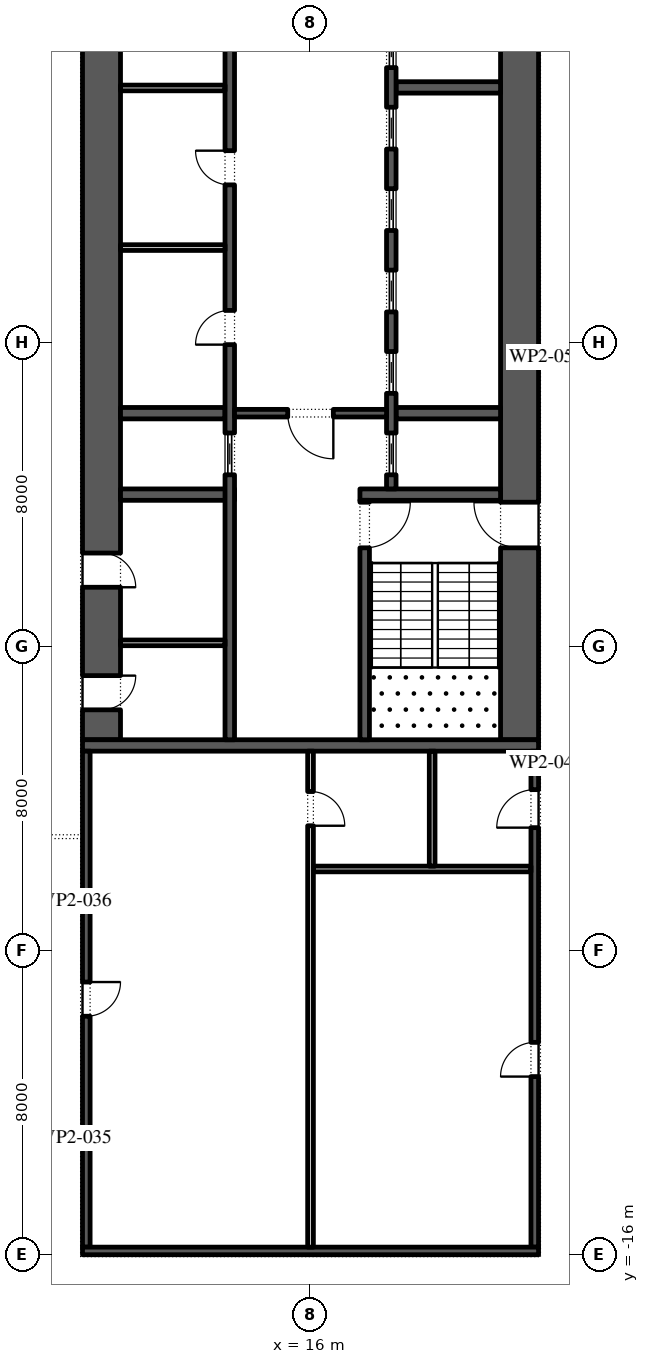
"""IFC4 building model, lengths in metres.
Left out: names, types, materials, properties, quantities, classifications, styles, units other than length and angle.
Written with IfcOpenShell. Run it as: python <this file> out.ifc"""

import sys

from ifc_helpers import new_model, si_unit, direction, frame, frame_2d, origin, place, context, subcontext, project, spatial, rectangle, extrude, element, fill, save


model = new_model("IFC4")
c1 = context("Model", 3, precision=1e-05, world=origin(), true_north=direction((0.0, 1.0)))
c2 = subcontext(c1, "Body", "Model", "MODEL_VIEW")
j1 = project(units=[si_unit("LENGTHUNIT", "METRE"), si_unit("PLANEANGLEUNIT", "RADIAN")], contexts=[c1])
p1 = place(None, origin())
s1 = spatial("IfcSite", under=j1, at=p1, CompositionType="ELEMENT")
p2 = place(p1, origin())
s2 = spatial("IfcBuilding", under=s1, at=p2, CompositionType="ELEMENT")
p3 = place(p2, frame((0.0, 0.0, 56.4)))
s3 = spatial("IfcBuildingStorey", under=s2, at=p3, CompositionType="ELEMENT", Elevation=56.4)
p4 = place(p3, frame((21.5, -2.45, 0.0), z_axis=(0.0, 0.0, 1.0), x_axis=(0.0, 1.0, 0.0)))
e1 = element("IfcWall", 1, at=p4, inside=s3, PredefinedType="SHEAR", context=c2, shape_type="SweptSolid", body=[
    extrude(rectangle(XDim=27.9, YDim=1.0, at=frame_2d((13.95, 0.0))), origin(), (0.0, 0.0, 1.0), 4.0),
])
p5 = place(p4, frame((5.05, 0.0, 0.0)))
e2 = element("IfcOpeningElement", 2, at=p5, cuts=e1, PredefinedType="OPENING", context=c2, shape_type="SweptSolid", body=[
    extrude(rectangle(XDim=1.2, YDim=2.1, at=frame_2d((0.6, 1.05))), frame((0.0, 0.51, 0.0), z_axis=(0.0, -1.0, 0.0), x_axis=(1.0, 0.0, 0.0)), (0.0, 0.0, 1.0), 1.02),
])
p6 = place(p4, frame((21.65, 0.0, 0.0)))
e3 = element("IfcOpeningElement", 3, at=p6, cuts=e1, PredefinedType="OPENING", context=c2, shape_type="SweptSolid", body=[
    extrude(rectangle(XDim=1.2, YDim=2.1, at=frame_2d((0.6, 1.05))), frame((0.0, 0.51, 0.0), z_axis=(0.0, -1.0, 0.0), x_axis=(1.0, 0.0, 0.0)), (0.0, 0.0, 1.0), 1.02),
])
p7 = place(p3, frame((10.5, -2.45, 0.0), z_axis=(0.0, 0.0, 1.0), x_axis=(0.0, 1.0, 0.0)))
e4 = element("IfcWall", 4, at=p7, inside=s3, PredefinedType="SHEAR", context=c2, shape_type="SweptSolid", body=[
    extrude(rectangle(XDim=27.9, YDim=1.0, at=frame_2d((13.95, 0.0))), origin(), (0.0, 0.0, 1.0), 4.0),
])
p8 = place(p7, frame((23.65, 0.0, 0.0)))
e5 = element("IfcOpeningElement", 5, at=p8, cuts=e4, PredefinedType="OPENING", context=c2, shape_type="SweptSolid", body=[
    extrude(rectangle(XDim=2.4, YDim=2.1, at=frame_2d((1.2, 1.05))), frame((0.0, 0.51, 0.0), z_axis=(0.0, -1.0, 0.0), x_axis=(1.0, 0.0, 0.0)), (0.0, 0.0, 1.0), 1.02),
])
p9 = place(p7, frame((0.788, 0.0, 0.0)))
e6 = element("IfcOpeningElement", 6, at=p9, cuts=e4, PredefinedType="OPENING", context=c2, shape_type="SweptSolid", body=[
    extrude(rectangle(XDim=0.9, YDim=2.1, at=frame_2d((0.45, 1.05))), frame((0.0, 0.51, 0.0), z_axis=(0.0, -1.0, 0.0), x_axis=(1.0, 0.0, 0.0)), (0.0, 0.0, 1.0), 1.02),
])
p10 = place(p7, frame((4.012, 0.0, 0.0)))
e7 = element("IfcOpeningElement", 7, at=p10, cuts=e4, PredefinedType="OPENING", context=c2, shape_type="SweptSolid", body=[
    extrude(rectangle(XDim=0.9, YDim=2.1, at=frame_2d((0.45, 1.05))), frame((0.0, 0.51, 0.0), z_axis=(0.0, -1.0, 0.0), x_axis=(1.0, 0.0, 0.0)), (0.0, 0.0, 1.0), 1.02),
])
p11 = place(p3, frame((10.0, -2.6, 0.0), z_axis=(0.0, 0.0, 1.0), x_axis=(1.0, 0.0, 0.0)))
e8 = element("IfcWall", 8, at=p11, inside=s3, PredefinedType="SHEAR", context=c2, shape_type="SweptSolid", body=[
    extrude(rectangle(XDim=12.0, YDim=0.3, at=frame_2d((6.0, 0.0))), origin(), (0.0, 0.0, 1.0), 4.0),
])
p12 = place(p3, frame((17.3, 4.0, 0.0), z_axis=(0.0, 0.0, 1.0), x_axis=(1.0, 0.0, 0.0)))
e9 = element("IfcWall", 9, at=p12, inside=s3, PredefinedType="SHEAR", context=c2, shape_type="SweptSolid", body=[
    extrude(rectangle(XDim=3.7, YDim=0.3, at=frame_2d((1.85, 0.0))), origin(), (0.0, 0.0, 1.0), 4.0),
])
p13 = place(p3, frame((17.425, -2.45, 0.0), z_axis=(0.0, 0.0, 1.0), x_axis=(0.0, 1.0, 0.0)))
e10 = element("IfcWall", 10, at=p13, inside=s3, PredefinedType="SHEAR", context=c2, shape_type="SweptSolid", body=[
    extrude(rectangle(XDim=6.3, YDim=0.25, at=frame_2d((3.15, 0.0))), origin(), (0.0, 0.0, 1.0), 4.0),
])
p14 = place(p13, frame((5.05, 0.0, 0.0)))
e11 = element("IfcOpeningElement", 11, at=p14, cuts=e10, PredefinedType="OPENING", context=c2, shape_type="SweptSolid", body=[
    extrude(rectangle(XDim=1.2, YDim=2.1, at=frame_2d((0.6, 1.05))), frame((0.0, 0.135, 0.0), z_axis=(0.0, -1.0, 0.0), x_axis=(1.0, 0.0, 0.0)), (0.0, 0.0, 1.0), 0.27),
])
for number, where, z_axis, x_axis in (
    (12, (18.25, 6.143, 0.0), (0.0, 0.0, 1.0), (1.0, 0.0, 0.0)),
    (13, (18.25, 14.714, 0.0), (0.0, 0.0, 1.0), (1.0, 0.0, 0.0)),
):
    element("IfcWall", number, at=place(p3, frame(where, z_axis=z_axis, x_axis=x_axis)), inside=s3, PredefinedType="SHEAR", context=c2, shape_type="SweptSolid", body=[
        extrude(rectangle(XDim=2.75, YDim=0.3, at=frame_2d((1.375, 0.0))), origin(), (0.0, 0.0, 1.0), 4.0),
    ])
p15 = place(p3, frame((18.125, 4.15, 0.0), z_axis=(0.0, 0.0, 1.0), x_axis=(0.0, 1.0, 0.0)))
e14 = element("IfcWall", 14, at=p15, inside=s3, PredefinedType="SHEAR", context=c2, shape_type="SweptSolid", body=[
    extrude(rectangle(XDim=14.7, YDim=0.25, at=frame_2d((7.35, 0.0))), origin(), (0.0, 0.0, 1.0), 4.0),
])
p16 = place(p15, frame((0.371, 0.0, 0.0)))
e15 = element("IfcOpeningElement", 15, at=p16, cuts=e14, PredefinedType="OPENING", context=c2, shape_type="SweptSolid", body=[
    extrude(rectangle(XDim=1.1, YDim=2.1, at=frame_2d((0.55, 1.05))), frame((0.0, 0.135, 0.0), z_axis=(0.0, -1.0, 0.0), x_axis=(1.0, 0.0, 0.0)), (0.0, 0.0, 1.0), 0.27),
])
p17 = place(p15, frame((2.514, 0.0, 0.0)))
e16 = element("IfcOpeningElement", 16, at=p17, cuts=e14, PredefinedType="OPENING", context=c2, shape_type="SweptSolid", body=[
    extrude(rectangle(XDim=1.1, YDim=2.1, at=frame_2d((0.55, 1.05))), frame((0.0, 0.135, 0.0), z_axis=(0.0, -1.0, 0.0), x_axis=(1.0, 0.0, 0.0)), (0.0, 0.0, 1.0), 0.27),
])
p18 = place(p15, frame((4.657, 0.0, 0.0)))
e17 = element("IfcOpeningElement", 17, at=p18, cuts=e14, PredefinedType="OPENING", context=c2, shape_type="SweptSolid", body=[
    extrude(rectangle(XDim=1.1, YDim=2.1, at=frame_2d((0.55, 1.05))), frame((0.0, 0.135, 0.0), z_axis=(0.0, -1.0, 0.0), x_axis=(1.0, 0.0, 0.0)), (0.0, 0.0, 1.0), 0.27),
])
p19 = place(p15, frame((6.8, 0.0, 0.0)))
e18 = element("IfcOpeningElement", 18, at=p19, cuts=e14, PredefinedType="OPENING", context=c2, shape_type="SweptSolid", body=[
    extrude(rectangle(XDim=1.1, YDim=2.1, at=frame_2d((0.55, 1.05))), frame((0.0, 0.135, 0.0), z_axis=(0.0, -1.0, 0.0), x_axis=(1.0, 0.0, 0.0)), (0.0, 0.0, 1.0), 0.27),
])
p20 = place(p15, frame((8.943, 0.0, 0.0)))
e19 = element("IfcOpeningElement", 19, at=p20, cuts=e14, PredefinedType="OPENING", context=c2, shape_type="SweptSolid", body=[
    extrude(rectangle(XDim=1.1, YDim=2.1, at=frame_2d((0.55, 1.05))), frame((0.0, 0.135, 0.0), z_axis=(0.0, -1.0, 0.0), x_axis=(1.0, 0.0, 0.0)), (0.0, 0.0, 1.0), 0.27),
])
p21 = place(p15, frame((11.086, 0.0, 0.0)))
e20 = element("IfcOpeningElement", 20, at=p21, cuts=e14, PredefinedType="OPENING", context=c2, shape_type="SweptSolid", body=[
    extrude(rectangle(XDim=1.1, YDim=2.1, at=frame_2d((0.55, 1.05))), frame((0.0, 0.135, 0.0), z_axis=(0.0, -1.0, 0.0), x_axis=(1.0, 0.0, 0.0)), (0.0, 0.0, 1.0), 0.27),
])
p22 = place(p15, frame((13.229, 0.0, 0.0)))
e21 = element("IfcOpeningElement", 21, at=p22, cuts=e14, PredefinedType="OPENING", context=c2, shape_type="SweptSolid", body=[
    extrude(rectangle(XDim=1.1, YDim=2.1, at=frame_2d((0.55, 1.05))), frame((0.0, 0.135, 0.0), z_axis=(0.0, -1.0, 0.0), x_axis=(1.0, 0.0, 0.0)), (0.0, 0.0, 1.0), 0.27),
])
p23 = place(p3, frame((11.0, 4.0, 0.0), z_axis=(0.0, 0.0, 1.0), x_axis=(1.0, 0.0, 0.0)))
e22 = element("IfcWall", 22, at=p23, inside=s3, PredefinedType="SHEAR", context=c2, shape_type="SweptSolid", body=[
    extrude(rectangle(XDim=3.0, YDim=0.3, at=frame_2d((1.5, 0.0))), origin(), (0.0, 0.0, 1.0), 4.0),
])
p24 = place(p3, frame((11.0, 6.143, 0.0), z_axis=(0.0, 0.0, 1.0), x_axis=(1.0, 0.0, 0.0)))
e23 = element("IfcWall", 23, at=p24, inside=s3, PredefinedType="SHEAR", context=c2, shape_type="SweptSolid", body=[
    extrude(rectangle(XDim=2.75, YDim=0.3, at=frame_2d((1.375, 0.0))), origin(), (0.0, 0.0, 1.0), 4.0),
])
p25 = place(p3, frame((13.875, -2.45, 0.0), z_axis=(0.0, 0.0, 1.0), x_axis=(0.0, 1.0, 0.0)))
e24 = element("IfcWall", 24, at=p25, inside=s3, PredefinedType="SHEAR", context=c2, shape_type="SweptSolid", body=[
    extrude(rectangle(XDim=21.3, YDim=0.25, at=frame_2d((10.65, 0.0))), origin(), (0.0, 0.0, 1.0), 4.0),
])
p26 = place(p25, frame((10.396, 0.0, 0.0)))
e25 = element("IfcOpeningElement", 25, at=p26, cuts=e24, PredefinedType="OPENING", context=c2, shape_type="SweptSolid", body=[
    extrude(rectangle(XDim=0.9, YDim=2.1, at=frame_2d((0.45, 1.05))), frame((0.0, 0.135, 0.0), z_axis=(0.0, -1.0, 0.0), x_axis=(1.0, 0.0, 0.0)), (0.0, 0.0, 1.0), 0.27),
])
p27 = place(p25, frame((14.6, 0.0, 0.0)))
e26 = element("IfcOpeningElement", 26, at=p27, cuts=e24, PredefinedType="OPENING", context=c2, shape_type="SweptSolid", body=[
    extrude(rectangle(XDim=0.9, YDim=2.1, at=frame_2d((0.45, 1.05))), frame((0.0, 0.135, 0.0), z_axis=(0.0, -1.0, 0.0), x_axis=(1.0, 0.0, 0.0)), (0.0, 0.0, 1.0), 0.27),
])
p28 = place(p25, frame((18.775, 0.0, 0.0)))
e27 = element("IfcOpeningElement", 27, at=p28, cuts=e24, PredefinedType="OPENING", context=c2, shape_type="SweptSolid", body=[
    extrude(rectangle(XDim=0.9, YDim=2.1, at=frame_2d((0.45, 1.05))), frame((0.0, 0.135, 0.0), z_axis=(0.0, -1.0, 0.0), x_axis=(1.0, 0.0, 0.0)), (0.0, 0.0, 1.0), 0.27),
])
p29 = place(p25, frame((6.971, 0.0, 0.0)))
e28 = element("IfcOpeningElement", 28, at=p29, cuts=e24, PredefinedType="OPENING", context=c2, shape_type="SweptSolid", body=[
    extrude(rectangle(XDim=1.1, YDim=2.1, at=frame_2d((0.55, 1.05))), frame((0.0, 0.135, 0.0), z_axis=(0.0, -1.0, 0.0), x_axis=(1.0, 0.0, 0.0)), (0.0, 0.0, 1.0), 0.27),
])
for number, where, z_axis, x_axis in (
    (29, (11.0, 10.5, 0.0), (0.0, 0.0, 1.0), (1.0, 0.0, 0.0)),
    (30, (11.0, 14.7, 0.0), (0.0, 0.0, 1.0), (1.0, 0.0, 0.0)),
):
    element("IfcWall", number, at=place(p3, frame(where, z_axis=z_axis, x_axis=x_axis)), inside=s3, PredefinedType="PARTITIONING", context=c2, shape_type="SweptSolid", body=[
        extrude(rectangle(XDim=2.75, YDim=0.15, at=frame_2d((1.375, 0.0))), origin(), (0.0, 0.0, 1.0), 4.0),
    ])
p30 = place(p3, frame((14.0, 6.143, 0.0), z_axis=(0.0, 0.0, 1.0), x_axis=(1.0, 0.0, 0.0)))
e31 = element("IfcWall", 31, at=p30, inside=s3, PredefinedType="SHEAR", context=c2, shape_type="SweptSolid", body=[
    extrude(rectangle(XDim=4.0, YDim=0.2, at=frame_2d((2.0, 0.0))), origin(), (0.0, 0.0, 1.0), 4.0),
])
p31 = place(p30, frame((1.4, 0.0, 0.0)))
e32 = element("IfcOpeningElement", 32, at=p31, cuts=e31, PredefinedType="OPENING", context=c2, shape_type="SweptSolid", body=[
    extrude(rectangle(XDim=1.2, YDim=2.1, at=frame_2d((0.6, 1.05))), frame((0.0, 0.11, 0.0), z_axis=(0.0, -1.0, 0.0), x_axis=(1.0, 0.0, 0.0)), (0.0, 0.0, 1.0), 0.22),
])
p32 = place(p3, frame((11.0, 0.1, 0.0), z_axis=(0.0, 0.0, 1.0), x_axis=(1.0, 0.0, 0.0)))
e33 = element("IfcWall", 33, at=p32, inside=s3, PredefinedType="PARTITIONING", context=c2, shape_type="SweptSolid", body=[
    extrude(rectangle(XDim=2.75, YDim=0.15, at=frame_2d((1.375, 0.0))), origin(), (0.0, 0.0, 1.0), 4.0),
])
p33 = place(p3, frame((21.9, -15.8, 0.0), z_axis=(0.0, 0.0, 1.0), x_axis=(0.0, 1.0, 0.0)))
e34 = element("IfcWall", 34, at=p33, inside=s3, PredefinedType="SHEAR", context=c2, shape_type="SweptSolid", body=[
    extrude(rectangle(XDim=13.05, YDim=0.2, at=frame_2d((6.525, 0.0))), origin(), (0.0, 0.0, 1.0), 4.0),
])
p34 = place(p33, frame((4.488, 0.0, 0.0)))
e35 = element("IfcOpeningElement", 35, at=p34, cuts=e34, PredefinedType="OPENING", context=c2, shape_type="SweptSolid", body=[
    extrude(rectangle(XDim=0.9, YDim=2.1, at=frame_2d((0.45, 1.05))), frame((0.0, 0.11, 0.0), z_axis=(0.0, -1.0, 0.0), x_axis=(1.0, 0.0, 0.0)), (0.0, 0.0, 1.0), 0.22),
])
p35 = place(p33, frame((11.038, 0.0, 0.0)))
e36 = element("IfcOpeningElement", 36, at=p35, cuts=e34, PredefinedType="OPENING", context=c2, shape_type="SweptSolid", body=[
    extrude(rectangle(XDim=1.0, YDim=2.1, at=frame_2d((0.5, 1.05))), frame((0.0, 0.11, 0.0), z_axis=(0.0, -1.0, 0.0), x_axis=(1.0, 0.0, 0.0)), (0.0, 0.0, 1.0), 0.22),
])
p36 = place(p3, frame((10.1, -15.8, 0.0), z_axis=(0.0, 0.0, 1.0), x_axis=(0.0, 1.0, 0.0)))
e37 = element("IfcWall", 37, at=p36, inside=s3, PredefinedType="SHEAR", context=c2, shape_type="SweptSolid", body=[
    extrude(rectangle(XDim=13.05, YDim=0.2, at=frame_2d((6.525, 0.0))), origin(), (0.0, 0.0, 1.0), 4.0),
])
p37 = place(p36, frame((6.075, 0.0, 0.0)))
e38 = element("IfcOpeningElement", 38, at=p37, cuts=e37, PredefinedType="OPENING", context=c2, shape_type="SweptSolid", body=[
    extrude(rectangle(XDim=0.9, YDim=2.1, at=frame_2d((0.45, 1.05))), frame((0.0, 0.11, 0.0), z_axis=(0.0, -1.0, 0.0), x_axis=(1.0, 0.0, 0.0)), (0.0, 0.0, 1.0), 0.22),
])
p38 = place(p3, frame((10.0, -15.9, 0.0), z_axis=(0.0, 0.0, 1.0), x_axis=(1.0, 0.0, 0.0)))
e39 = element("IfcWall", 39, at=p38, inside=s3, PredefinedType="SHEAR", context=c2, shape_type="SweptSolid", body=[
    extrude(rectangle(XDim=12.0, YDim=0.2, at=frame_2d((6.0, 0.0))), origin(), (0.0, 0.0, 1.0), 4.0),
])
p39 = place(p3, frame((16.0, -15.8, 0.0), z_axis=(0.0, 0.0, 1.0), x_axis=(0.0, 1.0, 0.0)))
e40 = element("IfcWall", 40, at=p39, inside=s3, PredefinedType="PARTITIONING", context=c2, shape_type="SweptSolid", body=[
    extrude(rectangle(XDim=13.05, YDim=0.15, at=frame_2d((6.525, 0.0))), origin(), (0.0, 0.0, 1.0), 4.0),
])
p40 = place(p39, frame((11.087, 0.0, 0.0)))
e41 = element("IfcOpeningElement", 41, at=p40, cuts=e40, PredefinedType="OPENING", context=c2, shape_type="SweptSolid", body=[
    extrude(rectangle(XDim=0.9, YDim=2.1, at=frame_2d((0.45, 1.05))), frame((0.0, 0.085, 0.0), z_axis=(0.0, -1.0, 0.0), x_axis=(1.0, 0.0, 0.0)), (0.0, 0.0, 1.0), 0.17),
])
p41 = place(p3, frame((16.075, -5.85, 0.0), z_axis=(0.0, 0.0, 1.0), x_axis=(1.0, 0.0, 0.0)))
e42 = element("IfcWall", 42, at=p41, inside=s3, PredefinedType="PARTITIONING", context=c2, shape_type="SweptSolid", body=[
    extrude(rectangle(XDim=5.725, YDim=0.15, at=frame_2d((2.863, 0.0))), origin(), (0.0, 0.0, 1.0), 4.0),
])
p42 = place(p3, frame((19.2, -5.775, 0.0), z_axis=(0.0, 0.0, 1.0), x_axis=(0.0, 1.0, 0.0)))
e43 = element("IfcWall", 43, at=p42, inside=s3, PredefinedType="PARTITIONING", context=c2, shape_type="SweptSolid", body=[
    extrude(rectangle(XDim=3.025, YDim=0.15, at=frame_2d((1.512, 0.0))), origin(), (0.0, 0.0, 1.0), 4.0),
])
p43 = place(p16, origin())
e44 = element("IfcDoor", 44, at=p43, inside=s3, OperationType="SLIDING_TO_LEFT", PredefinedType="DOOR", context=c2, shape_type="SweptSolid", body=[
    extrude(rectangle(XDim=1.1, YDim=2.1, at=frame_2d((0.55, 1.05))), frame((0.0, 0.025, 0.0), z_axis=(0.0, -1.0, 0.0), x_axis=(1.0, 0.0, 0.0)), (0.0, 0.0, 1.0), 0.05),
])
fill(e15, e44)
p44 = place(p17, origin())
e45 = element("IfcDoor", 45, at=p44, inside=s3, OperationType="SLIDING_TO_LEFT", PredefinedType="DOOR", context=c2, shape_type="SweptSolid", body=[
    extrude(rectangle(XDim=1.1, YDim=2.1, at=frame_2d((0.55, 1.05))), frame((0.0, 0.025, 0.0), z_axis=(0.0, -1.0, 0.0), x_axis=(1.0, 0.0, 0.0)), (0.0, 0.0, 1.0), 0.05),
])
fill(e16, e45)
p45 = place(p18, origin())
e46 = element("IfcDoor", 46, at=p45, inside=s3, OperationType="SLIDING_TO_LEFT", PredefinedType="DOOR", context=c2, shape_type="SweptSolid", body=[
    extrude(rectangle(XDim=1.1, YDim=2.1, at=frame_2d((0.55, 1.05))), frame((0.0, 0.025, 0.0), z_axis=(0.0, -1.0, 0.0), x_axis=(1.0, 0.0, 0.0)), (0.0, 0.0, 1.0), 0.05),
])
fill(e17, e46)
p46 = place(p19, origin())
e47 = element("IfcDoor", 47, at=p46, inside=s3, OperationType="SLIDING_TO_LEFT", PredefinedType="DOOR", context=c2, shape_type="SweptSolid", body=[
    extrude(rectangle(XDim=1.1, YDim=2.1, at=frame_2d((0.55, 1.05))), frame((0.0, 0.025, 0.0), z_axis=(0.0, -1.0, 0.0), x_axis=(1.0, 0.0, 0.0)), (0.0, 0.0, 1.0), 0.05),
])
fill(e18, e47)
p47 = place(p20, origin())
e48 = element("IfcDoor", 48, at=p47, inside=s3, OperationType="SLIDING_TO_LEFT", PredefinedType="DOOR", context=c2, shape_type="SweptSolid", body=[
    extrude(rectangle(XDim=1.1, YDim=2.1, at=frame_2d((0.55, 1.05))), frame((0.0, 0.025, 0.0), z_axis=(0.0, -1.0, 0.0), x_axis=(1.0, 0.0, 0.0)), (0.0, 0.0, 1.0), 0.05),
])
fill(e19, e48)
p48 = place(p21, origin())
e49 = element("IfcDoor", 49, at=p48, inside=s3, OperationType="SLIDING_TO_LEFT", PredefinedType="DOOR", context=c2, shape_type="SweptSolid", body=[
    extrude(rectangle(XDim=1.1, YDim=2.1, at=frame_2d((0.55, 1.05))), frame((0.0, 0.025, 0.0), z_axis=(0.0, -1.0, 0.0), x_axis=(1.0, 0.0, 0.0)), (0.0, 0.0, 1.0), 0.05),
])
fill(e20, e49)
p49 = place(p26, origin())
e50 = element("IfcDoor", 50, at=p49, inside=s3, OperationType="SINGLE_SWING_RIGHT", PredefinedType="DOOR", context=c2, shape_type="SweptSolid", body=[
    extrude(rectangle(XDim=0.9, YDim=2.1, at=frame_2d((0.45, 1.05))), frame((0.0, 0.125, 0.0), z_axis=(0.0, -1.0, 0.0), x_axis=(1.0, 0.0, 0.0)), (0.0, 0.0, 1.0), 0.05),
])
fill(e25, e50)
p50 = place(p27, origin())
e51 = element("IfcDoor", 51, at=p50, inside=s3, OperationType="SINGLE_SWING_LEFT", PredefinedType="DOOR", context=c2, shape_type="SweptSolid", body=[
    extrude(rectangle(XDim=0.9, YDim=2.1, at=frame_2d((0.45, 1.05))), frame((0.0, 0.125, 0.0), z_axis=(0.0, -1.0, 0.0), x_axis=(1.0, 0.0, 0.0)), (0.0, 0.0, 1.0), 0.05),
])
fill(e26, e51)
p51 = place(p29, origin())
e52 = element("IfcDoor", 52, at=p51, inside=s3, OperationType="SLIDING_TO_LEFT", PredefinedType="DOOR", context=c2, shape_type="SweptSolid", body=[
    extrude(rectangle(XDim=1.1, YDim=2.1, at=frame_2d((0.55, 1.05))), frame((0.0, 0.025, 0.0), z_axis=(0.0, -1.0, 0.0), x_axis=(1.0, 0.0, 0.0)), (0.0, 0.0, 1.0), 0.05),
])
fill(e28, e52)
p52 = place(p31, frame((1.2, 0.0, 0.0), z_axis=(0.0, 0.0, 1.0), x_axis=(-1.0, 0.0, 0.0)))
e53 = element("IfcDoor", 53, at=p52, inside=s3, OperationType="SINGLE_SWING_RIGHT", PredefinedType="DOOR", context=c2, shape_type="SweptSolid", body=[
    extrude(rectangle(XDim=1.2, YDim=2.1, at=frame_2d((0.6, 1.05))), frame((0.0, 0.025, 0.0), z_axis=(0.0, -1.0, 0.0), x_axis=(1.0, 0.0, 0.0)), (0.0, 0.0, 1.0), 0.05),
])
fill(e32, e53)
p53 = place(p14, frame((1.2, 0.0, 0.0), z_axis=(0.0, 0.0, 1.0), x_axis=(-1.0, 0.0, 0.0)))
e54 = element("IfcDoor", 54, at=p53, inside=s3, OperationType="SINGLE_SWING_RIGHT", PredefinedType="DOOR", context=c2, shape_type="SweptSolid", body=[
    extrude(rectangle(XDim=1.2, YDim=2.1, at=frame_2d((0.6, 1.05))), frame((0.0, 0.025, 0.0), z_axis=(0.0, -1.0, 0.0), x_axis=(1.0, 0.0, 0.0)), (0.0, 0.0, 1.0), 0.05),
])
fill(e11, e54)
p54 = place(p5, origin())
e55 = element("IfcDoor", 55, at=p54, inside=s3, OperationType="SINGLE_SWING_LEFT", PredefinedType="DOOR", context=c2, shape_type="SweptSolid", body=[
    extrude(rectangle(XDim=1.2, YDim=2.1, at=frame_2d((0.6, 1.05))), frame((0.0, 0.025, 0.0), z_axis=(0.0, -1.0, 0.0), x_axis=(1.0, 0.0, 0.0)), (0.0, 0.0, 1.0), 0.05),
])
fill(e2, e55)
p55 = place(p9, frame((0.9, -0.95, 0.0), z_axis=(0.0, 0.0, 1.0), x_axis=(-1.0, 0.0, 0.0)))
e56 = element("IfcDoor", 56, at=p55, inside=s3, OperationType="SINGLE_SWING_RIGHT", PredefinedType="DOOR", context=c2, shape_type="SweptSolid", body=[
    extrude(rectangle(XDim=0.9, YDim=2.1, at=frame_2d((0.45, 1.05))), frame((0.0, -0.45, 0.0), z_axis=(0.0, -1.0, 0.0), x_axis=(1.0, 0.0, 0.0)), (0.0, 0.0, 1.0), 0.05),
])
fill(e6, e56)
p56 = place(p10, frame((0.9, -0.95, 0.0), z_axis=(0.0, 0.0, 1.0), x_axis=(-1.0, 0.0, 0.0)))
e57 = element("IfcDoor", 57, at=p56, inside=s3, OperationType="SINGLE_SWING_LEFT", PredefinedType="DOOR", context=c2, shape_type="SweptSolid", body=[
    extrude(rectangle(XDim=0.9, YDim=2.1, at=frame_2d((0.45, 1.05))), frame((0.0, -0.45, 0.0), z_axis=(0.0, -1.0, 0.0), x_axis=(1.0, 0.0, 0.0)), (0.0, 0.0, 1.0), 0.05),
])
fill(e7, e57)
p57 = place(p34, origin())
e58 = element("IfcDoor", 58, at=p57, inside=s3, OperationType="SINGLE_SWING_RIGHT", PredefinedType="DOOR", context=c2, shape_type="SweptSolid", body=[
    extrude(rectangle(XDim=0.9, YDim=2.1, at=frame_2d((0.45, 1.05))), frame((0.0, 0.1, 0.0), z_axis=(0.0, -1.0, 0.0), x_axis=(1.0, 0.0, 0.0)), (0.0, 0.0, 1.0), 0.05),
])
fill(e35, e58)
p58 = place(p35, origin())
e59 = element("IfcDoor", 59, at=p58, inside=s3, OperationType="SINGLE_SWING_RIGHT", PredefinedType="DOOR", context=c2, shape_type="SweptSolid", body=[
    extrude(rectangle(XDim=1.0, YDim=2.1, at=frame_2d((0.5, 1.05))), frame((0.0, 0.1, 0.0), z_axis=(0.0, -1.0, 0.0), x_axis=(1.0, 0.0, 0.0)), (0.0, 0.0, 1.0), 0.05),
])
fill(e36, e59)
p59 = place(p40, frame((0.9, 0.0, 0.0), z_axis=(0.0, 0.0, 1.0), x_axis=(-1.0, 0.0, 0.0)))
e60 = element("IfcDoor", 60, at=p59, inside=s3, OperationType="SINGLE_SWING_LEFT", PredefinedType="DOOR", context=c2, shape_type="SweptSolid", body=[
    extrude(rectangle(XDim=0.9, YDim=2.1, at=frame_2d((0.45, 1.05))), frame((0.0, 0.025, 0.0), z_axis=(0.0, -1.0, 0.0), x_axis=(1.0, 0.0, 0.0)), (0.0, 0.0, 1.0), 0.05),
])
fill(e41, e60)
p60 = place(p37, frame((0.9, -0.15, 0.0), z_axis=(0.0, 0.0, 1.0), x_axis=(-1.0, 0.0, 0.0)))
e61 = element("IfcDoor", 61, at=p60, inside=s3, OperationType="SINGLE_SWING_RIGHT", PredefinedType="DOOR", context=c2, shape_type="SweptSolid", body=[
    extrude(rectangle(XDim=0.9, YDim=2.1, at=frame_2d((0.45, 1.05))), frame((0.0, -0.05, 0.0), z_axis=(0.0, -1.0, 0.0), x_axis=(1.0, 0.0, 0.0)), (0.0, 0.0, 1.0), 0.05),
])
fill(e38, e61)
save(model, sys.argv[1])
